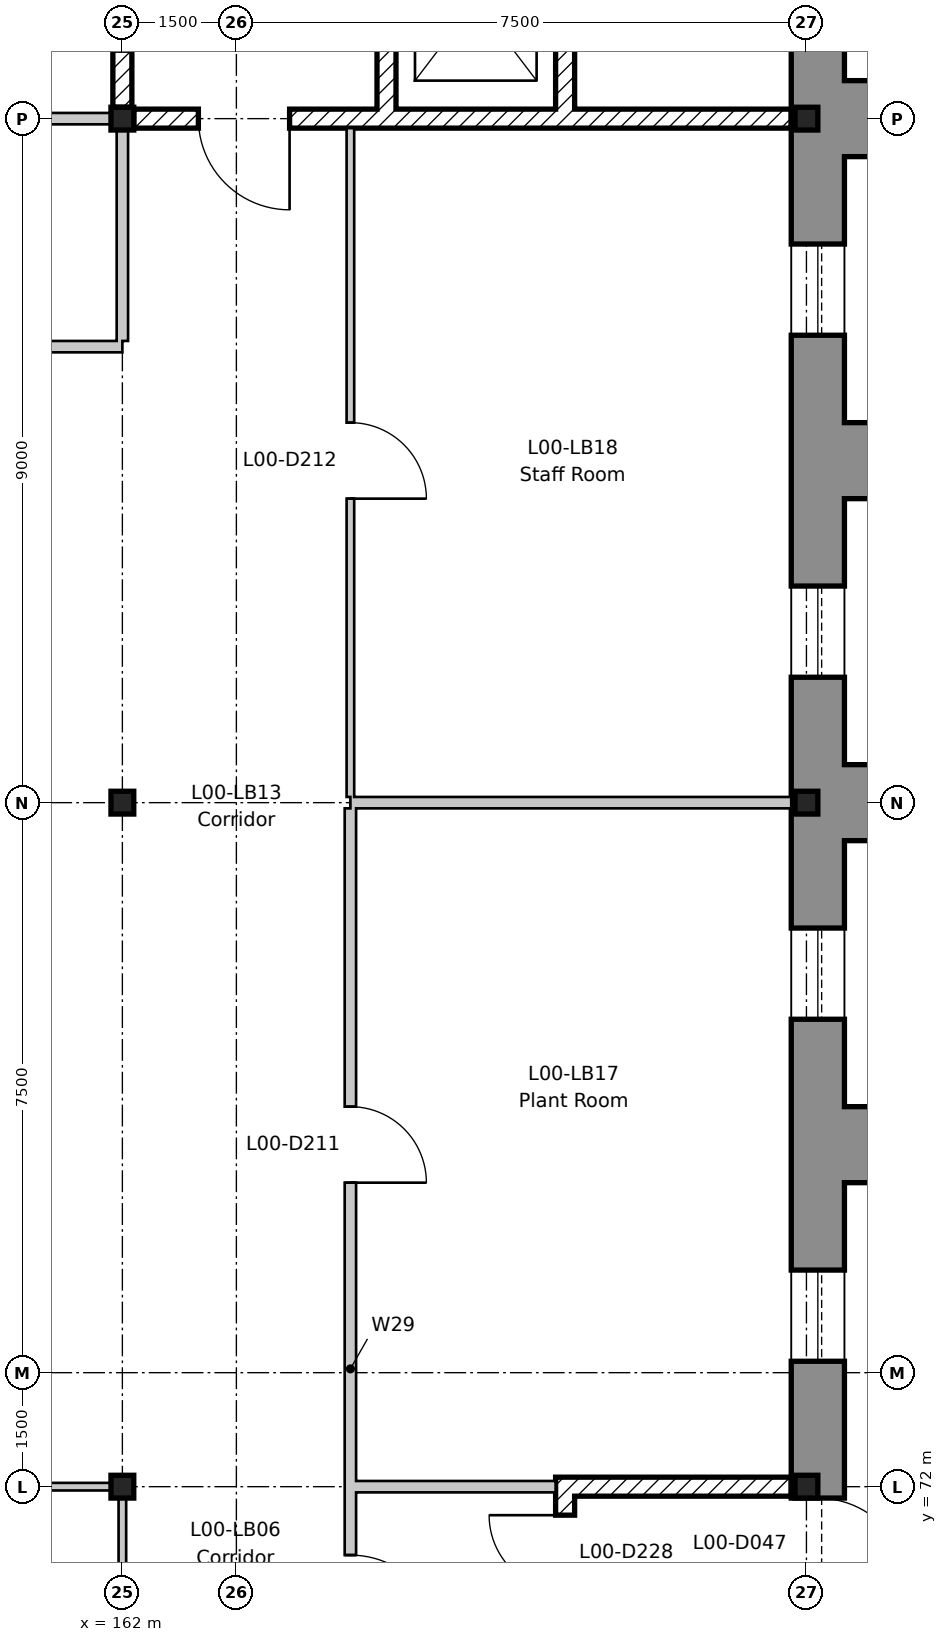
"""IFC4 building model, lengths in metres.
Left out: names, types, materials, properties, quantities, classifications, styles, units other than length and angle.
Written with IfcOpenShell. Run it as: python <this file> out.ifc"""

import sys

from ifc_helpers import new_model, si_unit, direction, frame, frame_2d, origin, origin_2d, place, context, subcontext, project, spatial, rectangle, i_section, extrude, element, fill, save


model = new_model("IFC4")
c1 = context("Model", 3, precision=1e-05, world=origin(), true_north=direction((0.0, 1.0)))
c2 = subcontext(c1, "Body", "Model", "MODEL_VIEW")
j1 = project(units=[si_unit("LENGTHUNIT", "METRE"), si_unit("PLANEANGLEUNIT", "RADIAN")], contexts=[c1])
p1 = place(None, origin())
s1 = spatial("IfcSite", under=j1, at=p1, CompositionType="ELEMENT")
p2 = place(p1, origin())
s2 = spatial("IfcBuilding", under=s1, at=p2, CompositionType="ELEMENT")
p3 = place(p2, origin())
s3 = spatial("IfcBuildingStorey", under=s2, at=p3, CompositionType="ELEMENT", Elevation=0.0)
for number, where, z_axis, x_axis in (
    (1, (162.0, 72.0, -0.6), (0.0, 0.0, 1.0), (1.0, 0.0, 0.0)),
    (2, (162.0, 81.0, -0.6), (0.0, 0.0, 1.0), (1.0, 0.0, 0.0)),
    (3, (162.0, 90.0, -0.6), (0.0, 0.0, 1.0), (1.0, 0.0, 0.0)),
    (4, (171.0, 72.0, -0.6), (0.0, 0.0, 1.0), (1.0, 0.0, 0.0)),
    (5, (171.0, 81.0, -0.6), (0.0, 0.0, 1.0), (1.0, 0.0, 0.0)),
    (6, (171.0, 90.0, -0.6), (0.0, 0.0, 1.0), (1.0, 0.0, 0.0)),
):
    element("IfcColumn", number, at=place(p3, frame(where, z_axis=z_axis, x_axis=x_axis)), inside=s3, PredefinedType="COLUMN", context=c2, shape_type="SweptSolid", body=[
        extrude(i_section(OverallWidth=0.3, OverallDepth=0.3, WebThickness=0.011, FlangeThickness=0.019, FilletRadius=0.027, at=origin_2d()), origin(), (0.0, 0.0, 1.0), 5.8),
    ])
p4 = place(p3, frame((167.825, 98.8, 0.0), z_axis=(0.0, 0.0, 1.0), x_axis=(0.0, -1.0, 0.0)))
e7 = element("IfcWall", 7, at=p4, inside=s3, PredefinedType="SHEAR", context=c2, shape_type="SweptSolid", body=[
    extrude(rectangle(XDim=8.675, YDim=0.25, at=frame_2d((4.337, 0.0))), origin(), (0.0, 0.0, 1.0), 5.2),
])
p5 = place(p4, frame((0.25, 0.0, 0.0)))
e8 = element("IfcOpeningElement", 8, at=p5, cuts=e7, PredefinedType="OPENING", context=c2, shape_type="SweptSolid", body=[
    extrude(rectangle(XDim=1.0, YDim=2.1, at=frame_2d((0.5, 1.05))), frame((0.0, 0.135, 0.0), z_axis=(0.0, -1.0, 0.0), x_axis=(1.0, 0.0, 0.0)), (0.0, 0.0, 1.0), 0.27),
])
p6 = place(p3, frame((162.0, 98.8, 0.0), z_axis=(0.0, 0.0, 1.0), x_axis=(0.0, -1.0, 0.0)))
e9 = element("IfcWall", 9, at=p6, inside=s3, PredefinedType="SHEAR", context=c2, shape_type="SweptSolid", body=[
    extrude(rectangle(XDim=8.65, YDim=0.25, at=frame_2d((4.325, 0.0))), origin(), (0.0, 0.0, 1.0), 5.2),
])
p7 = place(p6, frame((6.7, 0.0, 0.0)))
e10 = element("IfcOpeningElement", 10, at=p7, cuts=e9, PredefinedType="OPENING", context=c2, shape_type="SweptSolid", body=[
    extrude(rectangle(XDim=1.2, YDim=2.1, at=frame_2d((0.6, 1.05))), frame((0.0, 0.135, 0.0), z_axis=(0.0, -1.0, 0.0), x_axis=(1.0, 0.0, 0.0)), (0.0, 0.0, 1.0), 0.27),
])
p8 = place(p3, frame((170.8, 90.0, 0.0), z_axis=(0.0, 0.0, 1.0), x_axis=(-1.0, 0.0, 0.0)))
e11 = element("IfcWall", 11, at=p8, inside=s3, PredefinedType="SHEAR", context=c2, shape_type="SweptSolid", body=[
    extrude(rectangle(XDim=8.65, YDim=0.25, at=frame_2d((4.325, 0.0))), origin(), (0.0, 0.0, 1.0), 5.2),
])
p9 = place(p8, frame((6.6, 0.0, 0.0)))
e12 = element("IfcOpeningElement", 12, at=p9, cuts=e11, PredefinedType="OPENING", context=c2, shape_type="SweptSolid", body=[
    extrude(rectangle(XDim=1.2, YDim=2.1, at=frame_2d((0.6, 1.05))), frame((0.0, 0.135, 0.0), z_axis=(0.0, -1.0, 0.0), x_axis=(1.0, 0.0, 0.0)), (0.0, 0.0, 1.0), 0.27),
])
p10 = place(p3, frame((165.475, 92.725, 0.0), z_axis=(0.0, 0.0, 1.0), x_axis=(0.0, -1.0, 0.0)))
e13 = element("IfcWall", 13, at=p10, inside=s3, PredefinedType="SHEAR", context=c2, shape_type="SweptSolid", body=[
    extrude(rectangle(XDim=2.6, YDim=0.25, at=frame_2d((1.3, 0.0))), origin(), (0.0, 0.0, 1.0), 5.2),
])
for number, where, z_axis, x_axis in (
    (14, (165.475, 92.975, -1.2), (0.0, 0.0, 1.0), (0.0, -1.0, 0.0)),
    (15, (167.825, 92.975, -1.2), (0.0, 0.0, 1.0), (0.0, -1.0, 0.0)),
):
    element("IfcWall", number, at=place(p3, frame(where, z_axis=z_axis, x_axis=x_axis)), inside=s3, PredefinedType="SHEAR", context=c2, shape_type="SweptSolid", body=[
        extrude(rectangle(XDim=2.85, YDim=0.25, at=frame_2d((1.425, 0.0))), origin(), (0.0, 0.0, 1.0), 1.2),
    ])
p11 = place(p3, frame((167.95, 90.0, -1.2), z_axis=(0.0, 0.0, 1.0), x_axis=(-1.0, 0.0, 0.0)))
e16 = element("IfcWall", 16, at=p11, inside=s3, PredefinedType="SHEAR", context=c2, shape_type="SweptSolid", body=[
    extrude(rectangle(XDim=2.6, YDim=0.25, at=frame_2d((1.3, 0.0))), origin(), (0.0, 0.0, 1.0), 1.2),
])
p12 = place(p3, frame((167.825, 71.875, 0.0), z_axis=(0.0, 0.0, 1.0), x_axis=(0.0, -1.0, 0.0)))
e17 = element("IfcWall", 17, at=p12, inside=s3, PredefinedType="SHEAR", context=c2, shape_type="SweptSolid", body=[
    extrude(rectangle(XDim=8.675, YDim=0.25, at=frame_2d((4.337, 0.0))), origin(), (0.0, 0.0, 1.0), 5.2),
])
p13 = place(p12, frame((0.25, 0.0, 0.0)))
e18 = element("IfcOpeningElement", 18, at=p13, cuts=e17, PredefinedType="OPENING", context=c2, shape_type="SweptSolid", body=[
    extrude(rectangle(XDim=1.0, YDim=2.1, at=frame_2d((0.5, 1.05))), frame((0.0, 0.135, 0.0), z_axis=(0.0, -1.0, 0.0), x_axis=(1.0, 0.0, 0.0)), (0.0, 0.0, 1.0), 0.27),
])
p14 = place(p3, frame((170.8, 72.0, 0.0), z_axis=(0.0, 0.0, 1.0), x_axis=(-1.0, 0.0, 0.0)))
e19 = element("IfcWall", 19, at=p14, inside=s3, PredefinedType="SHEAR", context=c2, shape_type="SweptSolid", body=[
    extrude(rectangle(XDim=3.1, YDim=0.25, at=frame_2d((1.55, 0.0))), origin(), (0.0, 0.0, 1.0), 4.7),
])
p15 = place(p3, frame((171.15, 63.2, 0.0), z_axis=(0.0, 0.0, 1.0), x_axis=(0.0, 1.0, 0.0)))
e20 = element("IfcWall", 20, at=p15, inside=s3, PredefinedType="STANDARD", context=c2, shape_type="SweptSolid", body=[
    extrude(rectangle(XDim=35.6, YDim=0.7, at=frame_2d((17.8, 0.0))), origin(), (0.0, 0.0, 1.0), 5.2),
])
p16 = place(p15, frame((1.45, 0.0, 1.2)))
e21 = element("IfcOpeningElement", 21, at=p16, cuts=e20, PredefinedType="OPENING", context=c2, shape_type="SweptSolid", body=[
    extrude(rectangle(XDim=1.2, YDim=1.8, at=frame_2d((0.6, 0.9))), frame((0.0, 0.36, 0.0), z_axis=(0.0, -1.0, 0.0), x_axis=(1.0, 0.0, 0.0)), (0.0, 0.0, 1.0), 0.72),
])
p17 = place(p15, frame((5.95, 0.0, 1.2)))
e22 = element("IfcOpeningElement", 22, at=p17, cuts=e20, PredefinedType="OPENING", context=c2, shape_type="SweptSolid", body=[
    extrude(rectangle(XDim=1.2, YDim=1.8, at=frame_2d((0.6, 0.9))), frame((0.0, 0.36, 0.0), z_axis=(0.0, -1.0, 0.0), x_axis=(1.0, 0.0, 0.0)), (0.0, 0.0, 1.0), 0.72),
])
p18 = place(p15, frame((10.45, 0.0, 1.2)))
e23 = element("IfcOpeningElement", 23, at=p18, cuts=e20, PredefinedType="OPENING", context=c2, shape_type="SweptSolid", body=[
    extrude(rectangle(XDim=1.2, YDim=1.8, at=frame_2d((0.6, 0.9))), frame((0.0, 0.36, 0.0), z_axis=(0.0, -1.0, 0.0), x_axis=(1.0, 0.0, 0.0)), (0.0, 0.0, 1.0), 0.72),
])
p19 = place(p15, frame((14.95, 0.0, 1.2)))
e24 = element("IfcOpeningElement", 24, at=p19, cuts=e20, PredefinedType="OPENING", context=c2, shape_type="SweptSolid", body=[
    extrude(rectangle(XDim=1.2, YDim=1.8, at=frame_2d((0.6, 0.9))), frame((0.0, 0.36, 0.0), z_axis=(0.0, -1.0, 0.0), x_axis=(1.0, 0.0, 0.0)), (0.0, 0.0, 1.0), 0.72),
])
p20 = place(p15, frame((19.45, 0.0, 1.2)))
e25 = element("IfcOpeningElement", 25, at=p20, cuts=e20, PredefinedType="OPENING", context=c2, shape_type="SweptSolid", body=[
    extrude(rectangle(XDim=1.2, YDim=1.8, at=frame_2d((0.6, 0.9))), frame((0.0, 0.36, 0.0), z_axis=(0.0, -1.0, 0.0), x_axis=(1.0, 0.0, 0.0)), (0.0, 0.0, 1.0), 0.72),
])
p21 = place(p15, frame((23.95, 0.0, 1.2)))
e26 = element("IfcOpeningElement", 26, at=p21, cuts=e20, PredefinedType="OPENING", context=c2, shape_type="SweptSolid", body=[
    extrude(rectangle(XDim=1.2, YDim=1.8, at=frame_2d((0.6, 0.9))), frame((0.0, 0.36, 0.0), z_axis=(0.0, -1.0, 0.0), x_axis=(1.0, 0.0, 0.0)), (0.0, 0.0, 1.0), 0.72),
])
p22 = place(p15, frame((7.45, 0.0, 0.0)))
e27 = element("IfcOpeningElement", 27, at=p22, cuts=e20, PredefinedType="OPENING", context=c2, shape_type="SweptSolid", body=[
    extrude(rectangle(XDim=1.2, YDim=2.1, at=frame_2d((0.6, 1.05))), frame((0.0, 0.36, 0.0), z_axis=(0.0, -1.0, 0.0), x_axis=(1.0, 0.0, 0.0)), (0.0, 0.0, 1.0), 0.72),
])
for number, where, z_axis, x_axis in (
    (28, (172.1, 76.0, 0.0), (0.0, 0.0, 1.0), (0.0, 1.0, 0.0)),
    (29, (172.1, 80.5, 0.0), (0.0, 0.0, 1.0), (0.0, 1.0, 0.0)),
    (30, (172.1, 85.0, 0.0), (0.0, 0.0, 1.0), (0.0, 1.0, 0.0)),
    (31, (172.1, 89.5, 0.0), (0.0, 0.0, 1.0), (0.0, 1.0, 0.0)),
):
    element("IfcWall", number, at=place(p3, frame(where, z_axis=z_axis, x_axis=x_axis)), inside=s3, PredefinedType="STANDARD", context=c2, shape_type="SweptSolid", body=[
        extrude(rectangle(XDim=1.0, YDim=1.2, at=frame_2d((0.5, 0.0))), origin(), (0.0, 0.0, 1.0), 5.4),
    ])
p23 = place(p3, frame((165.075, 72.0, 0.0), z_axis=(0.0, 0.0, 1.0), x_axis=(1.0, 0.0, 0.0)))
e32 = element("IfcWall", 32, at=p23, inside=s3, PredefinedType="PARTITIONING", context=c2, shape_type="SweptSolid", body=[
    extrude(rectangle(XDim=2.625, YDim=0.15, at=frame_2d((1.312, 0.0))), origin(), (0.0, 0.0, 1.0), 4.68),
])
p24 = place(p3, frame((153.15, 72.0, 0.0), z_axis=(0.0, 0.0, 1.0), x_axis=(1.0, 0.0, 0.0)))
e33 = element("IfcWall", 33, at=p24, inside=s3, PredefinedType="PARTITIONING", context=c2, shape_type="SweptSolid", body=[
    extrude(rectangle(XDim=8.7, YDim=0.1, at=frame_2d((4.35, 0.0))), origin(), (0.0, 0.0, 1.0), 4.68),
])
p25 = place(p24, frame((3.75, 0.0, 0.0)))
e34 = element("IfcOpeningElement", 34, at=p25, cuts=e33, PredefinedType="OPENING", context=c2, shape_type="SweptSolid", body=[
    extrude(rectangle(XDim=1.2, YDim=2.1, at=frame_2d((0.6, 1.05))), frame((0.0, 0.06, 0.0), z_axis=(0.0, -1.0, 0.0), x_axis=(1.0, 0.0, 0.0)), (0.0, 0.0, 1.0), 0.12),
])
p26 = place(p3, frame((165.0, 81.0, 0.0), z_axis=(0.0, 0.0, 1.0), x_axis=(1.0, 0.0, 0.0)))
e35 = element("IfcWall", 35, at=p26, inside=s3, PredefinedType="PARTITIONING", context=c2, shape_type="SweptSolid", body=[
    extrude(rectangle(XDim=5.8, YDim=0.15, at=frame_2d((2.9, 0.0))), origin(), (0.0, 0.0, 1.0), 4.68),
])
p27 = place(p3, frame((126.0, 87.0, 0.0), z_axis=(0.0, 0.0, 1.0), x_axis=(1.0, 0.0, 0.0)))
e36 = element("IfcWall", 36, at=p27, inside=s3, PredefinedType="PARTITIONING", context=c2, shape_type="SweptSolid", body=[
    extrude(rectangle(XDim=36.0, YDim=0.15, at=frame_2d((18.0, 0.0))), origin(), (0.0, 0.0, 1.0), 4.68),
])
p28 = place(p27, frame((5.5, 0.0, 0.0)))
e37 = element("IfcOpeningElement", 37, at=p28, cuts=e36, PredefinedType="OPENING", context=c2, shape_type="SweptSolid", body=[
    extrude(rectangle(XDim=1.0, YDim=2.1, at=frame_2d((0.5, 1.05))), frame((0.0, 0.085, 0.0), z_axis=(0.0, -1.0, 0.0), x_axis=(1.0, 0.0, 0.0)), (0.0, 0.0, 1.0), 0.17),
])
p29 = place(p27, frame((17.5, 0.0, 0.0)))
e38 = element("IfcOpeningElement", 38, at=p29, cuts=e36, PredefinedType="OPENING", context=c2, shape_type="SweptSolid", body=[
    extrude(rectangle(XDim=1.0, YDim=2.1, at=frame_2d((0.5, 1.05))), frame((0.0, 0.085, 0.0), z_axis=(0.0, -1.0, 0.0), x_axis=(1.0, 0.0, 0.0)), (0.0, 0.0, 1.0), 0.17),
])
p30 = place(p27, frame((29.5, 0.0, 0.0)))
e39 = element("IfcOpeningElement", 39, at=p30, cuts=e36, PredefinedType="OPENING", context=c2, shape_type="SweptSolid", body=[
    extrude(rectangle(XDim=1.0, YDim=2.1, at=frame_2d((0.5, 1.05))), frame((0.0, 0.085, 0.0), z_axis=(0.0, -1.0, 0.0), x_axis=(1.0, 0.0, 0.0)), (0.0, 0.0, 1.0), 0.17),
])
p31 = place(p3, frame((153.15, 90.0, 0.0), z_axis=(0.0, 0.0, 1.0), x_axis=(1.0, 0.0, 0.0)))
e40 = element("IfcWall", 40, at=p31, inside=s3, PredefinedType="PARTITIONING", context=c2, shape_type="SweptSolid", body=[
    extrude(rectangle(XDim=8.7, YDim=0.15, at=frame_2d((4.35, 0.0))), origin(), (0.0, 0.0, 1.0), 4.68),
])
p32 = place(p3, frame((162.0, 87.075, 0.0), z_axis=(0.0, 0.0, 1.0), x_axis=(0.0, 1.0, 0.0)))
e41 = element("IfcWall", 41, at=p32, inside=s3, PredefinedType="PARTITIONING", context=c2, shape_type="SweptSolid", body=[
    extrude(rectangle(XDim=2.775, YDim=0.15, at=frame_2d((1.388, 0.0))), origin(), (0.0, 0.0, 1.0), 4.68),
])
p33 = place(p3, frame((162.0, 63.2, 0.0), z_axis=(0.0, 0.0, 1.0), x_axis=(0.0, 1.0, 0.0)))
e42 = element("IfcWall", 42, at=p33, inside=s3, PredefinedType="PARTITIONING", context=c2, shape_type="SweptSolid", body=[
    extrude(rectangle(XDim=8.65, YDim=0.1, at=frame_2d((4.325, 0.0))), origin(), (0.0, 0.0, 1.0), 4.68),
])
p34 = place(p3, frame((165.0, 69.075, 0.0), z_axis=(0.0, 0.0, 1.0), x_axis=(0.0, 1.0, 0.0)))
e43 = element("IfcWall", 43, at=p34, inside=s3, PredefinedType="PARTITIONING", context=c2, shape_type="SweptSolid", body=[
    extrude(rectangle(XDim=11.85, YDim=0.15, at=frame_2d((5.925, 0.0))), origin(), (0.0, 0.0, 1.0), 4.68),
])
p35 = place(p34, frame((0.825, 0.0, 0.0)))
e44 = element("IfcOpeningElement", 44, at=p35, cuts=e43, PredefinedType="OPENING", context=c2, shape_type="SweptSolid", body=[
    extrude(rectangle(XDim=1.2, YDim=2.1, at=frame_2d((0.6, 1.05))), frame((0.0, 0.085, 0.0), z_axis=(0.0, -1.0, 0.0), x_axis=(1.0, 0.0, 0.0)), (0.0, 0.0, 1.0), 0.17),
])
p36 = place(p34, frame((6.925, 0.0, 0.0)))
e45 = element("IfcOpeningElement", 45, at=p36, cuts=e43, PredefinedType="OPENING", context=c2, shape_type="SweptSolid", body=[
    extrude(rectangle(XDim=1.0, YDim=2.1, at=frame_2d((0.5, 1.05))), frame((0.0, 0.085, 0.0), z_axis=(0.0, -1.0, 0.0), x_axis=(1.0, 0.0, 0.0)), (0.0, 0.0, 1.0), 0.17),
])
p37 = place(p3, frame((165.0, 81.075, 0.0), z_axis=(0.0, 0.0, 1.0), x_axis=(0.0, 1.0, 0.0)))
e46 = element("IfcWall", 46, at=p37, inside=s3, PredefinedType="PARTITIONING", context=c2, shape_type="SweptSolid", body=[
    extrude(rectangle(XDim=8.8, YDim=0.1, at=frame_2d((4.4, 0.0))), origin(), (0.0, 0.0, 1.0), 4.68),
])
p38 = place(p37, frame((3.925, 0.0, 0.0)))
e47 = element("IfcOpeningElement", 47, at=p38, cuts=e46, PredefinedType="OPENING", context=c2, shape_type="SweptSolid", body=[
    extrude(rectangle(XDim=1.0, YDim=2.1, at=frame_2d((0.5, 1.05))), frame((0.0, 0.06, 0.0), z_axis=(0.0, -1.0, 0.0), x_axis=(1.0, 0.0, 0.0)), (0.0, 0.0, 1.0), 0.12),
])
p39 = place(p18, origin())
e48 = element("IfcWindow", 48, at=p39, inside=s3, PartitioningType="SINGLE_PANEL", PredefinedType="WINDOW", context=c2, shape_type="SweptSolid", body=[
    extrude(rectangle(XDim=1.2, YDim=1.8, at=frame_2d((0.6, 0.9))), frame((0.0, 0.03, 0.0), z_axis=(0.0, -1.0, 0.0), x_axis=(1.0, 0.0, 0.0)), (0.0, 0.0, 1.0), 0.06),
])
fill(e23, e48)
p40 = place(p19, origin())
e49 = element("IfcWindow", 49, at=p40, inside=s3, PartitioningType="SINGLE_PANEL", PredefinedType="WINDOW", context=c2, shape_type="SweptSolid", body=[
    extrude(rectangle(XDim=1.2, YDim=1.8, at=frame_2d((0.6, 0.9))), frame((0.0, 0.03, 0.0), z_axis=(0.0, -1.0, 0.0), x_axis=(1.0, 0.0, 0.0)), (0.0, 0.0, 1.0), 0.06),
])
fill(e24, e49)
p41 = place(p20, origin())
e50 = element("IfcWindow", 50, at=p41, inside=s3, PartitioningType="SINGLE_PANEL", PredefinedType="WINDOW", context=c2, shape_type="SweptSolid", body=[
    extrude(rectangle(XDim=1.2, YDim=1.8, at=frame_2d((0.6, 0.9))), frame((0.0, 0.03, 0.0), z_axis=(0.0, -1.0, 0.0), x_axis=(1.0, 0.0, 0.0)), (0.0, 0.0, 1.0), 0.06),
])
fill(e25, e50)
p42 = place(p21, origin())
e51 = element("IfcWindow", 51, at=p42, inside=s3, PartitioningType="SINGLE_PANEL", PredefinedType="WINDOW", context=c2, shape_type="SweptSolid", body=[
    extrude(rectangle(XDim=1.2, YDim=1.8, at=frame_2d((0.6, 0.9))), frame((0.0, 0.03, 0.0), z_axis=(0.0, -1.0, 0.0), x_axis=(1.0, 0.0, 0.0)), (0.0, 0.0, 1.0), 0.06),
])
fill(e26, e51)
p43 = place(p22, frame((1.2, 0.0, 0.0), z_axis=(0.0, 0.0, 1.0), x_axis=(-1.0, 0.0, 0.0)))
e52 = element("IfcDoor", 52, at=p43, inside=s3, OperationType="SINGLE_SWING_RIGHT", PredefinedType="DOOR", context=c2, shape_type="SweptSolid", body=[
    extrude(rectangle(XDim=1.2, YDim=2.1, at=frame_2d((0.6, 1.05))), frame((0.0, 0.025, 0.0), z_axis=(0.0, -1.0, 0.0), x_axis=(1.0, 0.0, 0.0)), (0.0, 0.0, 1.0), 0.05),
])
fill(e27, e52)
p44 = place(p35, frame((1.2, 0.0, 0.0), z_axis=(0.0, 0.0, 1.0), x_axis=(-1.0, 0.0, 0.0)))
e53 = element("IfcDoor", 53, at=p44, inside=s3, OperationType="SINGLE_SWING_RIGHT", PredefinedType="DOOR", context=c2, shape_type="SweptSolid", body=[
    extrude(rectangle(XDim=1.2, YDim=2.1, at=frame_2d((0.6, 1.05))), frame((0.0, 0.025, 0.0), z_axis=(0.0, -1.0, 0.0), x_axis=(1.0, 0.0, 0.0)), (0.0, 0.0, 1.0), 0.05),
])
fill(e44, e53)
p45 = place(p36, frame((1.0, 0.0, 0.0), z_axis=(0.0, 0.0, 1.0), x_axis=(-1.0, 0.0, 0.0)))
e54 = element("IfcDoor", 54, at=p45, inside=s3, OperationType="SINGLE_SWING_RIGHT", PredefinedType="DOOR", context=c2, shape_type="SweptSolid", body=[
    extrude(rectangle(XDim=1.0, YDim=2.1, at=frame_2d((0.5, 1.05))), frame((0.0, 0.025, 0.0), z_axis=(0.0, -1.0, 0.0), x_axis=(1.0, 0.0, 0.0)), (0.0, 0.0, 1.0), 0.05),
])
fill(e45, e54)
p46 = place(p38, frame((1.0, 0.0, 0.0), z_axis=(0.0, 0.0, 1.0), x_axis=(-1.0, 0.0, 0.0)))
e55 = element("IfcDoor", 55, at=p46, inside=s3, OperationType="SINGLE_SWING_RIGHT", PredefinedType="DOOR", context=c2, shape_type="SweptSolid", body=[
    extrude(rectangle(XDim=1.0, YDim=2.1, at=frame_2d((0.5, 1.05))), frame((0.0, 0.025, 0.0), z_axis=(0.0, -1.0, 0.0), x_axis=(1.0, 0.0, 0.0)), (0.0, 0.0, 1.0), 0.05),
])
fill(e47, e55)
p47 = place(p9, origin())
e56 = element("IfcDoor", 56, at=p47, inside=s3, OperationType="SINGLE_SWING_LEFT", PredefinedType="DOOR", context=c2, shape_type="SweptSolid", body=[
    extrude(rectangle(XDim=1.2, YDim=2.1, at=frame_2d((0.6, 1.05))), frame((0.0, 0.025, 0.0), z_axis=(0.0, -1.0, 0.0), x_axis=(1.0, 0.0, 0.0)), (0.0, 0.0, 1.0), 0.05),
])
fill(e12, e56)
p48 = place(p13, frame((1.0, 0.0, 0.0), z_axis=(0.0, 0.0, 1.0), x_axis=(-1.0, 0.0, 0.0)))
e57 = element("IfcDoor", 57, at=p48, inside=s3, OperationType="SINGLE_SWING_RIGHT", PredefinedType="DOOR", context=c2, shape_type="SweptSolid", body=[
    extrude(rectangle(XDim=1.0, YDim=2.1, at=frame_2d((0.5, 1.05))), frame((0.0, 0.025, 0.0), z_axis=(0.0, -1.0, 0.0), x_axis=(1.0, 0.0, 0.0)), (0.0, 0.0, 1.0), 0.05),
])
fill(e18, e57)
save(model, sys.argv[1])
